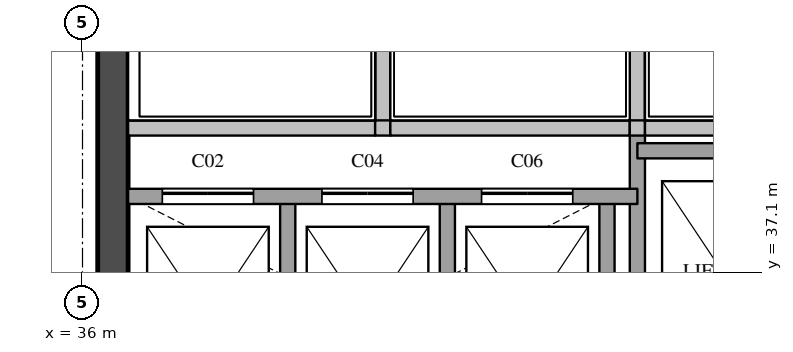
"""IFC4 building model, lengths in metres.
Left out: names, types, materials, properties, quantities, classifications, styles, units other than length and angle.
Written with IfcOpenShell. Run it as: python <this file> out.ifc"""

import sys

from ifc_helpers import new_model, si_unit, direction, frame, frame_2d, origin, place, context, subcontext, project, spatial, rectangle, extrude, element, fill, save


model = new_model("IFC4")
c1 = context("Model", 3, precision=1e-05, world=origin(), true_north=direction((0.0, 1.0)))
c2 = subcontext(c1, "Body", "Model", "MODEL_VIEW")
j1 = project(units=[si_unit("LENGTHUNIT", "METRE"), si_unit("PLANEANGLEUNIT", "RADIAN")], contexts=[c1])
p1 = place(None, origin())
s1 = spatial("IfcSite", under=j1, at=p1, CompositionType="ELEMENT")
p2 = place(p1, origin())
s2 = spatial("IfcBuilding", under=s1, at=p2, CompositionType="ELEMENT")
p3 = place(p2, frame((0.0, 0.0, 285.2)))
s3 = spatial("IfcBuildingStorey", under=s2, at=p3, CompositionType="ELEMENT", Elevation=285.2)
p4 = place(p3, frame((36.4, 29.1, 0.0), z_axis=(0.0, 0.0, 1.0), x_axis=(0.0, 1.0, 0.0)))
e1 = element("IfcWall", 1, at=p4, inside=s3, PredefinedType="SHEAR", context=c2, shape_type="SweptSolid", body=[
    extrude(rectangle(XDim=20.3, YDim=0.4, at=frame_2d((10.15, 0.0))), origin(), (0.0, 0.0, 1.0), 4.7),
])
p5 = place(p4, frame((3.6, 0.0, 0.0)))
e2 = element("IfcOpeningElement", 2, at=p5, cuts=e1, PredefinedType="OPENING", context=c2, shape_type="SweptSolid", body=[
    extrude(rectangle(XDim=1.8, YDim=2.1, at=frame_2d((0.9, 1.05))), frame((0.0, 0.21, 0.0), z_axis=(0.0, -1.0, 0.0), x_axis=(1.0, 0.0, 0.0)), (0.0, 0.0, 1.0), 0.42),
])
p6 = place(p4, frame((16.4, 0.0, 0.0)))
e3 = element("IfcOpeningElement", 3, at=p6, cuts=e1, PredefinedType="OPENING", context=c2, shape_type="SweptSolid", body=[
    extrude(rectangle(XDim=1.0, YDim=2.1, at=frame_2d((0.5, 1.05))), frame((0.0, 0.21, 0.0), z_axis=(0.0, -1.0, 0.0), x_axis=(1.0, 0.0, 0.0)), (0.0, 0.0, 1.0), 0.42),
])
p7 = place(p3, frame((38.7, 34.9, 0.0), z_axis=(0.0, 0.0, 1.0), x_axis=(0.0, 1.0, 0.0)))
e4 = element("IfcWall", 4, at=p7, inside=s3, PredefinedType="SOLIDWALL", context=c2, shape_type="SweptSolid", body=[
    extrude(rectangle(XDim=3.2, YDim=0.2, at=frame_2d((1.6, 0.0))), origin(), (0.0, 0.0, 1.0), 4.7),
])
p8 = place(p3, frame((39.95, 39.0, 0.0), z_axis=(0.0, 0.0, 1.0), x_axis=(0.0, 1.0, 0.0)))
e5 = element("IfcWall", 5, at=p8, inside=s3, PredefinedType="SOLIDWALL", context=c2, shape_type="SweptSolid", body=[
    extrude(rectangle(XDim=2.06, YDim=0.2, at=frame_2d((1.03, 0.0))), origin(), (0.0, 0.0, 1.0), 4.7),
])
for number, where, z_axis, x_axis in (
    (6, (40.8, 34.9, 0.0), (0.0, 0.0, 1.0), (0.0, 1.0, 0.0)),
    (7, (42.9, 34.9, 0.0), (0.0, 0.0, 1.0), (0.0, 1.0, 0.0)),
):
    element("IfcWall", number, at=place(p3, frame(where, z_axis=z_axis, x_axis=x_axis)), inside=s3, PredefinedType="SOLIDWALL", context=c2, shape_type="SweptSolid", body=[
        extrude(rectangle(XDim=3.2, YDim=0.2, at=frame_2d((1.6, 0.0))), origin(), (0.0, 0.0, 1.0), 4.7),
    ])
p9 = place(p3, frame((43.3, 29.1, 0.0), z_axis=(0.0, 0.0, 1.0), x_axis=(0.0, 1.0, 0.0)))
e8 = element("IfcWall", 8, at=p9, inside=s3, PredefinedType="SOLIDWALL", context=c2, shape_type="SweptSolid", body=[
    extrude(rectangle(XDim=9.9, YDim=0.2, at=frame_2d((4.95, 0.0))), origin(), (0.0, 0.0, 1.0), 4.7),
])
p10 = place(p3, frame((43.3, 39.0, 0.0), z_axis=(0.0, 0.0, 1.0), x_axis=(0.0, 1.0, 0.0)))
e9 = element("IfcWall", 9, at=p10, inside=s3, PredefinedType="SOLIDWALL", context=c2, shape_type="SweptSolid", body=[
    extrude(rectangle(XDim=2.06, YDim=0.2, at=frame_2d((1.03, 0.0))), origin(), (0.0, 0.0, 1.0), 4.7),
])
p11 = place(p3, frame((36.6, 38.1, 0.0), z_axis=(0.0, 0.0, 1.0), x_axis=(1.0, 0.0, 0.0)))
e10 = element("IfcWall", 10, at=p11, inside=s3, PredefinedType="SOLIDWALL", context=c2, shape_type="SweptSolid", body=[
    extrude(rectangle(XDim=6.7, YDim=0.2, at=frame_2d((3.35, 0.0))), origin(), (0.0, 0.0, 1.0), 4.7),
])
p12 = place(p11, frame((0.45, 0.0, 0.0)))
e11 = element("IfcOpeningElement", 11, at=p12, cuts=e10, PredefinedType="OPENING", context=c2, shape_type="SweptSolid", body=[
    extrude(rectangle(XDim=1.2, YDim=2.1, at=frame_2d((0.6, 1.05))), frame((0.0, 0.11, 0.0), z_axis=(0.0, -1.0, 0.0), x_axis=(1.0, 0.0, 0.0)), (0.0, 0.0, 1.0), 0.22),
])
p13 = place(p11, frame((2.55, 0.0, 0.0)))
e12 = element("IfcOpeningElement", 12, at=p13, cuts=e10, PredefinedType="OPENING", context=c2, shape_type="SweptSolid", body=[
    extrude(rectangle(XDim=1.2, YDim=2.1, at=frame_2d((0.6, 1.05))), frame((0.0, 0.11, 0.0), z_axis=(0.0, -1.0, 0.0), x_axis=(1.0, 0.0, 0.0)), (0.0, 0.0, 1.0), 0.22),
])
p14 = place(p11, frame((4.65, 0.0, 0.0)))
e13 = element("IfcOpeningElement", 13, at=p14, cuts=e10, PredefinedType="OPENING", context=c2, shape_type="SweptSolid", body=[
    extrude(rectangle(XDim=1.2, YDim=2.1, at=frame_2d((0.6, 1.05))), frame((0.0, 0.11, 0.0), z_axis=(0.0, -1.0, 0.0), x_axis=(1.0, 0.0, 0.0)), (0.0, 0.0, 1.0), 0.22),
])
p15 = place(p3, frame((43.3, 38.7, 0.0), z_axis=(0.0, 0.0, 1.0), x_axis=(1.0, 0.0, 0.0)))
e14 = element("IfcWall", 14, at=p15, inside=s3, PredefinedType="SOLIDWALL", context=c2, shape_type="SweptSolid", body=[
    extrude(rectangle(XDim=4.5, YDim=0.2, at=frame_2d((2.25, 0.0))), origin(), (0.0, 0.0, 1.0), 4.7),
])
p16 = place(p3, frame((36.6, 39.0, 0.0), z_axis=(0.0, 0.0, 1.0), x_axis=(1.0, 0.0, 0.0)))
e15 = element("IfcWall", 15, at=p16, inside=s3, PredefinedType="SOLIDWALL", context=c2, shape_type="SweptSolid", body=[
    extrude(rectangle(XDim=3.25, YDim=0.2, at=frame_2d((1.625, 0.0))), origin(), (0.0, 0.0, 1.0), 4.7),
])
p17 = place(p3, frame((39.85, 39.0, 0.0), z_axis=(0.0, 0.0, 1.0), x_axis=(1.0, 0.0, 0.0)))
e16 = element("IfcWall", 16, at=p17, inside=s3, PredefinedType="SOLIDWALL", context=c2, shape_type="SweptSolid", body=[
    extrude(rectangle(XDim=0.2, YDim=0.2, at=frame_2d((0.1, 0.0))), origin(), (0.0, 0.0, 1.0), 4.7),
])
p18 = place(p3, frame((40.05, 39.0, 0.0), z_axis=(0.0, 0.0, 1.0), x_axis=(1.0, 0.0, 0.0)))
e17 = element("IfcWall", 17, at=p18, inside=s3, PredefinedType="SOLIDWALL", context=c2, shape_type="SweptSolid", body=[
    extrude(rectangle(XDim=3.15, YDim=0.2, at=frame_2d((1.575, 0.0))), origin(), (0.0, 0.0, 1.0), 4.7),
])
p19 = place(p3, frame((43.2, 39.0, 0.0), z_axis=(0.0, 0.0, 1.0), x_axis=(1.0, 0.0, 0.0)))
e18 = element("IfcWall", 18, at=p19, inside=s3, PredefinedType="SOLIDWALL", context=c2, shape_type="SweptSolid", body=[
    extrude(rectangle(XDim=0.2, YDim=0.2, at=frame_2d((0.1, 0.0))), origin(), (0.0, 0.0, 1.0), 4.7),
])
p20 = place(p3, frame((43.4, 39.0, 0.0), z_axis=(0.0, 0.0, 1.0), x_axis=(1.0, 0.0, 0.0)))
e19 = element("IfcWall", 19, at=p20, inside=s3, PredefinedType="SOLIDWALL", context=c2, shape_type="SweptSolid", body=[
    extrude(rectangle(XDim=3.25, YDim=0.2, at=frame_2d((1.625, 0.0))), origin(), (0.0, 0.0, 1.0), 4.7),
])
p21 = place(p12, origin())
e20 = element("IfcDoor", 20, at=p21, inside=s3, OperationType="SLIDING_TO_LEFT", PredefinedType="DOOR", context=c2, shape_type="SweptSolid", body=[
    extrude(rectangle(XDim=1.2, YDim=2.1, at=frame_2d((0.6, 1.05))), frame((0.0, 0.025, 0.0), z_axis=(0.0, -1.0, 0.0), x_axis=(1.0, 0.0, 0.0)), (0.0, 0.0, 1.0), 0.05),
])
fill(e11, e20)
p22 = place(p13, origin())
e21 = element("IfcDoor", 21, at=p22, inside=s3, OperationType="SLIDING_TO_LEFT", PredefinedType="DOOR", context=c2, shape_type="SweptSolid", body=[
    extrude(rectangle(XDim=1.2, YDim=2.1, at=frame_2d((0.6, 1.05))), frame((0.0, 0.025, 0.0), z_axis=(0.0, -1.0, 0.0), x_axis=(1.0, 0.0, 0.0)), (0.0, 0.0, 1.0), 0.05),
])
fill(e12, e21)
p23 = place(p14, origin())
e22 = element("IfcDoor", 22, at=p23, inside=s3, OperationType="SLIDING_TO_LEFT", PredefinedType="DOOR", context=c2, shape_type="SweptSolid", body=[
    extrude(rectangle(XDim=1.2, YDim=2.1, at=frame_2d((0.6, 1.05))), frame((0.0, 0.025, 0.0), z_axis=(0.0, -1.0, 0.0), x_axis=(1.0, 0.0, 0.0)), (0.0, 0.0, 1.0), 0.05),
])
fill(e13, e22)
save(model, sys.argv[1])
